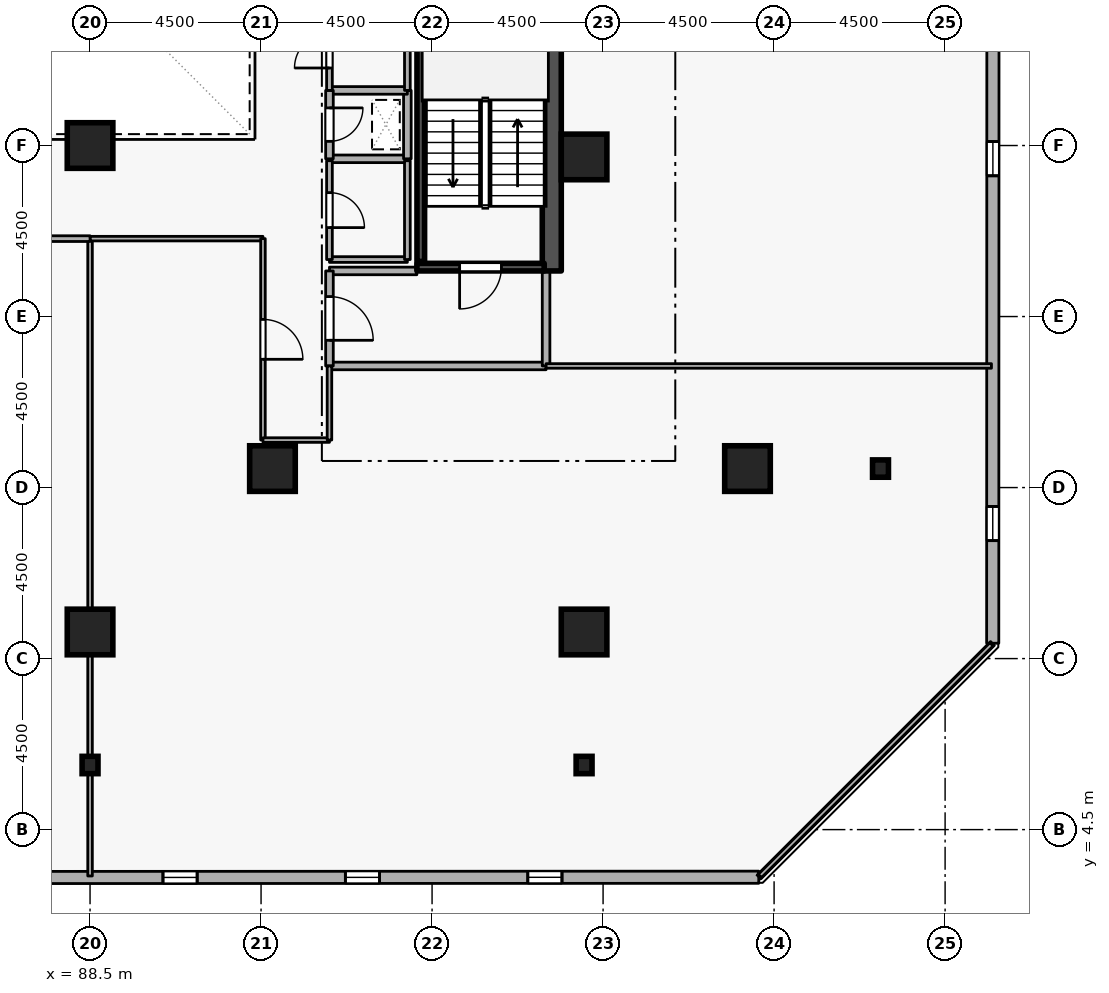
"""IFC4 building model, lengths in metres.
Left out: names, types, materials, properties, quantities, classifications, styles, units other than length and angle.
Written with IfcOpenShell. Run it as: python <this file> out.ifc"""

import sys

from ifc_helpers import new_model, si_unit, direction, frame, frame_2d, origin, origin_2d, place, context, subcontext, project, spatial, rectangle, i_section, extrude, element, fill, save


model = new_model("IFC4")
c1 = context("Model", 3, precision=1e-05, world=origin(), true_north=direction((0.0, 1.0)))
c2 = subcontext(c1, "Body", "Model", "MODEL_VIEW")
j1 = project(units=[si_unit("LENGTHUNIT", "METRE"), si_unit("PLANEANGLEUNIT", "RADIAN")], contexts=[c1])
p1 = place(None, origin())
s1 = spatial("IfcSite", under=j1, at=p1, CompositionType="ELEMENT")
p2 = place(p1, origin())
s2 = spatial("IfcBuilding", under=s1, at=p2, CompositionType="ELEMENT")
p3 = place(p2, frame((0.0, 0.0, 119.7)))
s3 = spatial("IfcBuildingStorey", under=s2, at=p3, CompositionType="ELEMENT", Elevation=119.7)
p4 = place(p3, frame((100.65, 19.2, 0.0), z_axis=(0.0, 0.0, 1.0), x_axis=(0.0, 1.0, 0.0)))
e1 = element("IfcWall", 1, at=p4, inside=s3, PredefinedType="SHEAR", context=c2, shape_type="SweptSolid", body=[
    extrude(rectangle(XDim=15.6, YDim=0.5, at=frame_2d((7.8, 0.0))), origin(), (0.0, 0.0, 1.0), 3.6),
])
for number, where, z_axis, x_axis in (
    (2, (105.8, 14.0, 0.0), (0.0, 0.0, 1.0), (1.0, 0.0, 0.0)),
    (3, (101.5, 9.7, 0.0), (0.0, 0.0, 1.0), (1.0, 0.0, 0.0)),
    (4, (88.5, 9.7, 0.0), (0.0, 0.0, 1.0), (1.0, 0.0, 0.0)),
    (5, (93.3, 14.0, 0.0), (0.0, 0.0, 1.0), (1.0, 0.0, 0.0)),
    (6, (101.5, 22.2, 0.0), (0.0, 0.0, 1.0), (1.0, 0.0, 0.0)),
    (7, (88.5, 22.5, 0.0), (0.0, 0.0, 1.0), (1.0, 0.0, 0.0)),
):
    element("IfcColumn", number, at=place(p3, frame(where, z_axis=z_axis, x_axis=x_axis)), inside=s3, PredefinedType="COLUMN", context=c2, shape_type="SweptSolid", body=[
        extrude(rectangle(XDim=1.2, YDim=1.2, at=origin_2d()), origin(), (0.0, 0.0, 1.0), 3.6),
    ])
for number, where, z_axis, x_axis in (
    (8, (109.3, 14.0, 0.0), (0.0, 0.0, 1.0), (1.0, 0.0, 0.0)),
    (9, (101.5, 6.2, 0.0), (0.0, 0.0, 1.0), (1.0, 0.0, 0.0)),
    (10, (88.5, 6.2, 0.0), (0.0, 0.0, 1.0), (1.0, 0.0, 0.0)),
):
    element("IfcColumn", number, at=place(p3, frame(where, z_axis=z_axis, x_axis=x_axis)), inside=s3, PredefinedType="COLUMN", context=c2, shape_type="SweptSolid", body=[
        extrude(i_section(OverallWidth=0.418, OverallDepth=0.456, WebThickness=0.042, FlangeThickness=0.067, FilletRadius=0.015, at=origin_2d()), origin(), (0.0, 0.0, 1.0), 3.6),
    ])
p5 = place(p3, frame((73.319, 3.235, 0.0), z_axis=(0.0, 0.0, 1.0), x_axis=(0.999999933399, 0.000364968916, 0.0)))
e11 = element("IfcWall", 11, at=p5, inside=s3, PredefinedType="STANDARD", context=c2, shape_type="SweptSolid", body=[
    extrude(rectangle(XDim=32.778, YDim=0.32, at=frame_2d((16.389, 0.0))), origin(), (0.0, 0.0, 1.0), 2.7),
])
p6 = place(p5, frame((2.7, 0.0, 0.72)))
e12 = element("IfcOpeningElement", 12, at=p6, cuts=e11, PredefinedType="OPENING", context=c2, shape_type="SweptSolid", body=[
    extrude(rectangle(XDim=0.9, YDim=1.75, at=frame_2d((0.45, 0.875))), frame((0.0, 0.17, 0.0), z_axis=(0.0, -1.0, 0.0), x_axis=(1.0, 0.0, 0.0)), (0.0, 0.0, 1.0), 0.34),
])
p7 = place(p5, frame((7.5, 0.0, 0.72)))
e13 = element("IfcOpeningElement", 13, at=p7, cuts=e11, PredefinedType="OPENING", context=c2, shape_type="SweptSolid", body=[
    extrude(rectangle(XDim=0.9, YDim=1.75, at=frame_2d((0.45, 0.875))), frame((0.0, 0.17, 0.0), z_axis=(0.0, -1.0, 0.0), x_axis=(1.0, 0.0, 0.0)), (0.0, 0.0, 1.0), 0.34),
])
p8 = place(p5, frame((12.3, 0.0, 0.72)))
e14 = element("IfcOpeningElement", 14, at=p8, cuts=e11, PredefinedType="OPENING", context=c2, shape_type="SweptSolid", body=[
    extrude(rectangle(XDim=0.9, YDim=1.75, at=frame_2d((0.45, 0.875))), frame((0.0, 0.17, 0.0), z_axis=(0.0, -1.0, 0.0), x_axis=(1.0, 0.0, 0.0)), (0.0, 0.0, 1.0), 0.34),
])
p9 = place(p5, frame((17.1, 0.0, 0.72)))
e15 = element("IfcOpeningElement", 15, at=p9, cuts=e11, PredefinedType="OPENING", context=c2, shape_type="SweptSolid", body=[
    extrude(rectangle(XDim=0.9, YDim=1.75, at=frame_2d((0.45, 0.875))), frame((0.0, 0.17, 0.0), z_axis=(0.0, -1.0, 0.0), x_axis=(1.0, 0.0, 0.0)), (0.0, 0.0, 1.0), 0.34),
])
p10 = place(p5, frame((21.9, 0.0, 0.72)))
e16 = element("IfcOpeningElement", 16, at=p10, cuts=e11, PredefinedType="OPENING", context=c2, shape_type="SweptSolid", body=[
    extrude(rectangle(XDim=0.9, YDim=1.75, at=frame_2d((0.45, 0.875))), frame((0.0, 0.17, 0.0), z_axis=(0.0, -1.0, 0.0), x_axis=(1.0, 0.0, 0.0)), (0.0, 0.0, 1.0), 0.34),
])
p11 = place(p5, frame((26.7, 0.0, 0.72)))
e17 = element("IfcOpeningElement", 17, at=p11, cuts=e11, PredefinedType="OPENING", context=c2, shape_type="SweptSolid", body=[
    extrude(rectangle(XDim=0.9, YDim=1.75, at=frame_2d((0.45, 0.875))), frame((0.0, 0.17, 0.0), z_axis=(0.0, -1.0, 0.0), x_axis=(1.0, 0.0, 0.0)), (0.0, 0.0, 1.0), 0.34),
])
p12 = place(p3, frame((112.253, 9.404, 0.0), z_axis=(0.0, 0.0, 1.0), x_axis=(0.000364968916, 0.999999933399, 0.0)))
e18 = element("IfcWall", 18, at=p12, inside=s3, PredefinedType="STANDARD", context=c2, shape_type="SweptSolid", body=[
    extrude(rectangle(XDim=32.778, YDim=0.32, at=frame_2d((16.389, 0.0))), origin(), (0.0, 0.0, 1.0), 2.7),
])
p13 = place(p12, frame((2.7, 0.0, 0.72)))
e19 = element("IfcOpeningElement", 19, at=p13, cuts=e18, PredefinedType="OPENING", context=c2, shape_type="SweptSolid", body=[
    extrude(rectangle(XDim=0.9, YDim=1.75, at=frame_2d((0.45, 0.875))), frame((0.0, 0.17, 0.0), z_axis=(0.0, -1.0, 0.0), x_axis=(1.0, 0.0, 0.0)), (0.0, 0.0, 1.0), 0.34),
])
p14 = place(p12, frame((12.3, 0.0, 0.72)))
e20 = element("IfcOpeningElement", 20, at=p14, cuts=e18, PredefinedType="OPENING", context=c2, shape_type="SweptSolid", body=[
    extrude(rectangle(XDim=0.9, YDim=1.75, at=frame_2d((0.45, 0.875))), frame((0.0, 0.17, 0.0), z_axis=(0.0, -1.0, 0.0), x_axis=(1.0, 0.0, 0.0)), (0.0, 0.0, 1.0), 0.34),
])
p15 = place(p12, frame((17.1, 0.0, 0.72)))
e21 = element("IfcOpeningElement", 21, at=p15, cuts=e18, PredefinedType="OPENING", context=c2, shape_type="SweptSolid", body=[
    extrude(rectangle(XDim=0.9, YDim=1.75, at=frame_2d((0.45, 0.875))), frame((0.0, 0.17, 0.0), z_axis=(0.0, -1.0, 0.0), x_axis=(1.0, 0.0, 0.0)), (0.0, 0.0, 1.0), 0.34),
])
p16 = place(p12, frame((21.9, 0.0, 0.72)))
e22 = element("IfcOpeningElement", 22, at=p16, cuts=e18, PredefinedType="OPENING", context=c2, shape_type="SweptSolid", body=[
    extrude(rectangle(XDim=0.9, YDim=1.75, at=frame_2d((0.45, 0.875))), frame((0.0, 0.17, 0.0), z_axis=(0.0, -1.0, 0.0), x_axis=(1.0, 0.0, 0.0)), (0.0, 0.0, 1.0), 0.34),
])
p17 = place(p12, frame((26.7, 0.0, 0.72)))
e23 = element("IfcOpeningElement", 23, at=p17, cuts=e18, PredefinedType="OPENING", context=c2, shape_type="SweptSolid", body=[
    extrude(rectangle(XDim=0.9, YDim=1.75, at=frame_2d((0.45, 0.875))), frame((0.0, 0.17, 0.0), z_axis=(0.0, -1.0, 0.0), x_axis=(1.0, 0.0, 0.0)), (0.0, 0.0, 1.0), 0.34),
])
p18 = place(p3, frame((100.45, 19.3, 0.0), z_axis=(0.0, 0.0, 1.0), x_axis=(-1.0, 0.0, 0.0)))
e24 = element("IfcWall", 24, at=p18, inside=s3, PredefinedType="SHEAR", context=c2, shape_type="SweptSolid", body=[
    extrude(rectangle(XDim=3.35, YDim=0.2, at=frame_2d((1.675, 0.0))), origin(), (0.0, 0.0, 1.0), 3.6),
])
p19 = place(p18, frame((1.125, 0.0, 0.0)))
e25 = element("IfcOpeningElement", 25, at=p19, cuts=e24, PredefinedType="OPENING", context=c2, shape_type="SweptSolid", body=[
    extrude(rectangle(XDim=1.1, YDim=2.1, at=frame_2d((0.55, 1.05))), frame((0.0, 0.11, 0.0), z_axis=(0.0, -1.0, 0.0), x_axis=(1.0, 0.0, 0.0)), (0.0, 0.0, 1.0), 0.22),
])
p20 = place(p3, frame((97.203, 26.55, 0.0), z_axis=(0.0, 0.0, 1.0), x_axis=(0.0, -1.0, 0.0)))
e26 = element("IfcWall", 26, at=p20, inside=s3, PredefinedType="SHEAR", context=c2, shape_type="SweptSolid", body=[
    extrude(rectangle(XDim=7.1, YDim=0.2, at=frame_2d((3.55, 0.0))), origin(), (0.0, 0.0, 1.0), 3.6),
])
p21 = place(p3, frame((94.8, 16.7, 0.0), z_axis=(0.0, 0.0, 1.0), x_axis=(1.0, 0.0, 0.0)))
e27 = element("IfcWall", 27, at=p21, inside=s3, PredefinedType="STANDARD", context=c2, shape_type="SweptSolid", body=[
    extrude(rectangle(XDim=5.7, YDim=0.2, at=frame_2d((2.85, 0.0))), origin(), (0.0, 0.0, 1.0), 3.32),
])
p22 = place(p3, frame((100.5, 16.7, 0.0), z_axis=(0.0, 0.0, 1.0), x_axis=(0.0, 1.0, 0.0)))
e28 = element("IfcWall", 28, at=p22, inside=s3, PredefinedType="STANDARD", context=c2, shape_type="SweptSolid", body=[
    extrude(rectangle(XDim=2.5, YDim=0.2, at=frame_2d((1.25, 0.0))), origin(), (0.0, 0.0, 1.0), 3.32),
])
p23 = place(p3, frame((97.1, 19.2, 0.0), z_axis=(0.0, 0.0, 1.0), x_axis=(-1.0, 0.0, 0.0)))
e29 = element("IfcWall", 29, at=p23, inside=s3, PredefinedType="STANDARD", context=c2, shape_type="SweptSolid", body=[
    extrude(rectangle(XDim=2.3, YDim=0.2, at=frame_2d((1.15, 0.0))), origin(), (0.0, 0.0, 1.0), 2.525),
])
p24 = place(p3, frame((94.8, 19.2, 0.0), z_axis=(0.0, 0.0, 1.0), x_axis=(0.0, -1.0, 0.0)))
e30 = element("IfcWall", 30, at=p24, inside=s3, PredefinedType="STANDARD", context=c2, shape_type="SweptSolid", body=[
    extrude(rectangle(XDim=2.5, YDim=0.2, at=frame_2d((1.25, 0.0))), origin(), (0.0, 0.0, 1.0), 3.32),
])
p25 = place(p24, frame((0.675, 0.0, 0.0)))
e31 = element("IfcOpeningElement", 31, at=p25, cuts=e30, PredefinedType="OPENING", context=c2, shape_type="SweptSolid", body=[
    extrude(rectangle(XDim=1.15, YDim=2.1, at=frame_2d((0.575, 1.05))), frame((0.0, 0.11, 0.0), z_axis=(0.0, -1.0, 0.0), x_axis=(1.0, 0.0, 0.0)), (0.0, 0.0, 1.0), 0.22),
])
p26 = place(p3, frame((94.8, 22.15, 0.0), z_axis=(0.0, 0.0, 1.0), x_axis=(1.0, 0.0, 0.0)))
e32 = element("IfcWall", 32, at=p26, inside=s3, PredefinedType="STANDARD", context=c2, shape_type="SweptSolid", body=[
    extrude(rectangle(XDim=2.05, YDim=0.2, at=frame_2d((1.025, 0.0))), origin(), (0.0, 0.0, 1.0), 3.32),
])
p27 = place(p3, frame((96.85, 22.15, 0.0), z_axis=(0.0, 0.0, 1.0), x_axis=(0.0, 1.0, 0.0)))
e33 = element("IfcWall", 33, at=p27, inside=s3, PredefinedType="STANDARD", context=c2, shape_type="SweptSolid", body=[
    extrude(rectangle(XDim=1.8, YDim=0.2, at=frame_2d((0.9, 0.0))), origin(), (0.0, 0.0, 1.0), 3.32),
])
p28 = place(p3, frame((96.85, 23.95, 0.0), z_axis=(0.0, 0.0, 1.0), x_axis=(-1.0, 0.0, 0.0)))
e34 = element("IfcWall", 34, at=p28, inside=s3, PredefinedType="STANDARD", context=c2, shape_type="SweptSolid", body=[
    extrude(rectangle(XDim=2.05, YDim=0.2, at=frame_2d((1.025, 0.0))), origin(), (0.0, 0.0, 1.0), 3.32),
])
p29 = place(p3, frame((94.8, 23.95, 0.0), z_axis=(0.0, 0.0, 1.0), x_axis=(0.0, -1.0, 0.0)))
e35 = element("IfcWall", 35, at=p29, inside=s3, PredefinedType="STANDARD", context=c2, shape_type="SweptSolid", body=[
    extrude(rectangle(XDim=1.8, YDim=0.2, at=frame_2d((0.9, 0.0))), origin(), (0.0, 0.0, 1.0), 3.32),
])
p30 = place(p29, frame((0.46, 0.0, 0.0)))
e36 = element("IfcOpeningElement", 36, at=p30, cuts=e35, PredefinedType="OPENING", context=c2, shape_type="SweptSolid", body=[
    extrude(rectangle(XDim=0.88, YDim=2.04, at=frame_2d((0.44, 1.02))), frame((0.0, 0.11, 0.0), z_axis=(0.0, -1.0, 0.0), x_axis=(1.0, 0.0, 0.0)), (0.0, 0.0, 1.0), 0.22),
])
p31 = place(p3, frame((94.8, 19.5, 0.0), z_axis=(0.0, 0.0, 1.0), x_axis=(1.0, 0.0, 0.0)))
e37 = element("IfcWall", 37, at=p31, inside=s3, PredefinedType="PARTITIONING", context=c2, shape_type="SweptSolid", body=[
    extrude(rectangle(XDim=2.05, YDim=0.15, at=frame_2d((1.025, 0.0))), origin(), (0.0, 0.0, 1.0), 2.525),
])
p32 = place(p3, frame((96.85, 19.5, 0.0), z_axis=(0.0, 0.0, 1.0), x_axis=(0.0, 1.0, 0.0)))
e38 = element("IfcWall", 38, at=p32, inside=s3, PredefinedType="PARTITIONING", context=c2, shape_type="SweptSolid", body=[
    extrude(rectangle(XDim=2.6, YDim=0.15, at=frame_2d((1.3, 0.0))), origin(), (0.0, 0.0, 1.0), 3.32),
])
p33 = place(p3, frame((94.8, 22.1, 0.0), z_axis=(0.0, 0.0, 1.0), x_axis=(0.0, -1.0, 0.0)))
e39 = element("IfcWall", 39, at=p33, inside=s3, PredefinedType="PARTITIONING", context=c2, shape_type="SweptSolid", body=[
    extrude(rectangle(XDim=2.6, YDim=0.15, at=frame_2d((1.3, 0.0))), origin(), (0.0, 0.0, 1.0), 3.32),
])
p34 = place(p33, frame((0.84, 0.0, 0.0)))
e40 = element("IfcOpeningElement", 40, at=p34, cuts=e39, PredefinedType="OPENING", context=c2, shape_type="SweptSolid", body=[
    extrude(rectangle(XDim=0.92, YDim=2.08, at=frame_2d((0.46, 1.04))), frame((0.0, 0.085, 0.0), z_axis=(0.0, -1.0, 0.0), x_axis=(1.0, 0.0, 0.0)), (0.0, 0.0, 1.0), 0.17),
])
p35 = place(p3, frame((94.8, 23.95, 0.0), z_axis=(0.0, 0.0, 1.0), x_axis=(0.0, 1.0, 0.0)))
e41 = element("IfcWall", 41, at=p35, inside=s3, PredefinedType="PARTITIONING", context=c2, shape_type="SweptSolid", body=[
    extrude(rectangle(XDim=2.1, YDim=0.15, at=frame_2d((1.05, 0.0))), origin(), (0.0, 0.0, 1.0), 3.32),
])
p36 = place(p35, frame((0.59, 0.0, 0.0)))
e42 = element("IfcOpeningElement", 42, at=p36, cuts=e41, PredefinedType="OPENING", context=c2, shape_type="SweptSolid", body=[
    extrude(rectangle(XDim=0.92, YDim=2.08, at=frame_2d((0.46, 1.04))), frame((0.0, 0.085, 0.0), z_axis=(0.0, -1.0, 0.0), x_axis=(1.0, 0.0, 0.0)), (0.0, 0.0, 1.0), 0.17),
])
p37 = place(p3, frame((96.85, 26.05, 0.0), z_axis=(0.0, 0.0, 1.0), x_axis=(0.0, -1.0, 0.0)))
e43 = element("IfcWall", 43, at=p37, inside=s3, PredefinedType="PARTITIONING", context=c2, shape_type="SweptSolid", body=[
    extrude(rectangle(XDim=2.1, YDim=0.15, at=frame_2d((1.05, 0.0))), origin(), (0.0, 0.0, 1.0), 3.32),
])
p38 = place(p3, frame((88.5, 3.28, 0.0), z_axis=(0.0, 0.0, 1.0), x_axis=(0.0, 1.0, 0.0)))
e44 = element("IfcWall", 44, at=p38, inside=s3, PredefinedType="PARTITIONING", context=c2, shape_type="SweptSolid", body=[
    extrude(rectangle(XDim=16.77, YDim=0.12, at=frame_2d((8.385, 0.0))), origin(), (0.0, 0.0, 1.0), 2.912),
])
p39 = place(p3, frame((88.5, 20.05, 0.0), z_axis=(0.0, 0.0, 1.0), x_axis=(1.0, 0.0, 0.0)))
e45 = element("IfcWall", 45, at=p39, inside=s3, PredefinedType="PARTITIONING", context=c2, shape_type="SweptSolid", body=[
    extrude(rectangle(XDim=4.55, YDim=0.12, at=frame_2d((2.275, 0.0))), origin(), (0.0, 0.0, 1.0), 3.32),
])
p40 = place(p3, frame((93.05, 20.05, 0.0), z_axis=(0.0, 0.0, 1.0), x_axis=(0.0, -1.0, 0.0)))
e46 = element("IfcWall", 46, at=p40, inside=s3, PredefinedType="PARTITIONING", context=c2, shape_type="SweptSolid", body=[
    extrude(rectangle(XDim=5.3, YDim=0.12, at=frame_2d((2.65, 0.0))), origin(), (0.0, 0.0, 1.0), 3.32),
])
p41 = place(p40, frame((2.125, 0.0, 0.0)))
e47 = element("IfcOpeningElement", 47, at=p41, cuts=e46, PredefinedType="OPENING", context=c2, shape_type="SweptSolid", body=[
    extrude(rectangle(XDim=1.05, YDim=2.1, at=frame_2d((0.525, 1.05))), frame((0.0, 0.07, 0.0), z_axis=(0.0, -1.0, 0.0), x_axis=(1.0, 0.0, 0.0)), (0.0, 0.0, 1.0), 0.14),
])
p42 = place(p3, frame((93.05, 14.75, 0.0), z_axis=(0.0, 0.0, 1.0), x_axis=(1.0, 0.0, 0.0)))
e48 = element("IfcWall", 48, at=p42, inside=s3, PredefinedType="PARTITIONING", context=c2, shape_type="SweptSolid", body=[
    extrude(rectangle(XDim=1.75, YDim=0.12, at=frame_2d((0.875, 0.0))), origin(), (0.0, 0.0, 1.0), 3.32),
])
p43 = place(p3, frame((94.8, 14.75, 0.0), z_axis=(0.0, 0.0, 1.0), x_axis=(0.0, 1.0, 0.0)))
e49 = element("IfcWall", 49, at=p43, inside=s3, PredefinedType="PARTITIONING", context=c2, shape_type="SweptSolid", body=[
    extrude(rectangle(XDim=1.95, YDim=0.12, at=frame_2d((0.975, 0.0))), origin(), (0.0, 0.0, 1.0), 3.32),
])
p44 = place(p3, frame((100.5, 16.7, 0.0), z_axis=(0.0, 0.0, 1.0), x_axis=(1.0, 0.0, 0.0)))
e50 = element("IfcWall", 50, at=p44, inside=s3, PredefinedType="PARTITIONING", context=c2, shape_type="SweptSolid", body=[
    extrude(rectangle(XDim=11.72, YDim=0.12, at=frame_2d((5.86, 0.0))), origin(), (0.0, 0.0, 1.0), 3.32),
])
p45 = place(p3, frame((112.22, 9.375, 0.0), z_axis=(0.0, 0.0, 1.0), x_axis=(-0.707106781187, -0.707106781187, 0.0)))
e51 = element("IfcWall", 51, at=p45, inside=s3, PredefinedType="PARTITIONING", context=c2, shape_type="SweptSolid", body=[
    extrude(rectangle(XDim=8.619, YDim=0.12, at=frame_2d((4.31, 0.0))), origin(), (0.0, 0.0, 1.0), 3.32),
])
p46 = place(p3, frame((83.95, 20.05, 0.0), z_axis=(0.0, 0.0, 1.0), x_axis=(1.0, 0.0, 0.0)))
e52 = element("IfcWall", 52, at=p46, inside=s3, PredefinedType="PARTITIONING", context=c2, shape_type="SweptSolid", body=[
    extrude(rectangle(XDim=4.55, YDim=0.15, at=frame_2d((2.275, 0.0))), origin(), (0.0, 0.0, 1.0), 3.32),
])
p47 = place(p9, origin())
e53 = element("IfcWindow", 53, at=p47, inside=s3, PartitioningType="SINGLE_PANEL", PredefinedType="WINDOW", context=c2, shape_type="SweptSolid", body=[
    extrude(rectangle(XDim=0.9, YDim=1.75, at=frame_2d((0.45, 0.875))), frame((0.0, 0.03, 0.0), z_axis=(0.0, -1.0, 0.0), x_axis=(1.0, 0.0, 0.0)), (0.0, 0.0, 1.0), 0.06),
])
fill(e15, e53)
p48 = place(p10, origin())
e54 = element("IfcWindow", 54, at=p48, inside=s3, PartitioningType="SINGLE_PANEL", PredefinedType="WINDOW", context=c2, shape_type="SweptSolid", body=[
    extrude(rectangle(XDim=0.9, YDim=1.75, at=frame_2d((0.45, 0.875))), frame((0.0, 0.03, 0.0), z_axis=(0.0, -1.0, 0.0), x_axis=(1.0, 0.0, 0.0)), (0.0, 0.0, 1.0), 0.06),
])
fill(e16, e54)
p49 = place(p11, origin())
e55 = element("IfcWindow", 55, at=p49, inside=s3, PartitioningType="SINGLE_PANEL", PredefinedType="WINDOW", context=c2, shape_type="SweptSolid", body=[
    extrude(rectangle(XDim=0.9, YDim=1.75, at=frame_2d((0.45, 0.875))), frame((0.0, 0.03, 0.0), z_axis=(0.0, -1.0, 0.0), x_axis=(1.0, 0.0, 0.0)), (0.0, 0.0, 1.0), 0.06),
])
fill(e17, e55)
p50 = place(p13, origin())
e56 = element("IfcWindow", 56, at=p50, inside=s3, PartitioningType="SINGLE_PANEL", PredefinedType="WINDOW", context=c2, shape_type="SweptSolid", body=[
    extrude(rectangle(XDim=0.9, YDim=1.75, at=frame_2d((0.45, 0.875))), frame((0.0, 0.03, 0.0), z_axis=(0.0, -1.0, 0.0), x_axis=(1.0, 0.0, 0.0)), (0.0, 0.0, 1.0), 0.06),
])
fill(e19, e56)
p51 = place(p14, origin())
e57 = element("IfcWindow", 57, at=p51, inside=s3, PartitioningType="SINGLE_PANEL", PredefinedType="WINDOW", context=c2, shape_type="SweptSolid", body=[
    extrude(rectangle(XDim=0.9, YDim=1.75, at=frame_2d((0.45, 0.875))), frame((0.0, 0.03, 0.0), z_axis=(0.0, -1.0, 0.0), x_axis=(1.0, 0.0, 0.0)), (0.0, 0.0, 1.0), 0.06),
])
fill(e20, e57)
p52 = place(p19, origin())
e58 = element("IfcDoor", 58, at=p52, inside=s3, OperationType="SINGLE_SWING_RIGHT", PredefinedType="DOOR", context=c2, shape_type="SweptSolid", body=[
    extrude(rectangle(XDim=1.1, YDim=2.1, at=frame_2d((0.55, 1.05))), frame((0.0, 0.025, 0.0), z_axis=(0.0, -1.0, 0.0), x_axis=(1.0, 0.0, 0.0)), (0.0, 0.0, 1.0), 0.05),
])
fill(e25, e58)
p53 = place(p25, origin())
e59 = element("IfcDoor", 59, at=p53, inside=s3, OperationType="SINGLE_SWING_RIGHT", PredefinedType="DOOR", context=c2, shape_type="SweptSolid", body=[
    extrude(rectangle(XDim=1.15, YDim=2.1, at=frame_2d((0.575, 1.05))), frame((0.0, 0.025, 0.0), z_axis=(0.0, -1.0, 0.0), x_axis=(1.0, 0.0, 0.0)), (0.0, 0.0, 1.0), 0.05),
])
fill(e31, e59)
p54 = place(p30, origin())
e60 = element("IfcDoor", 60, at=p54, inside=s3, OperationType="SINGLE_SWING_LEFT", PredefinedType="DOOR", context=c2, shape_type="SweptSolid", body=[
    extrude(rectangle(XDim=0.88, YDim=2.04, at=frame_2d((0.44, 1.02))), frame((0.0, 0.025, 0.0), z_axis=(0.0, -1.0, 0.0), x_axis=(1.0, 0.0, 0.0)), (0.0, 0.0, 1.0), 0.05),
])
fill(e36, e60)
p55 = place(p34, origin())
e61 = element("IfcDoor", 61, at=p55, inside=s3, OperationType="SINGLE_SWING_RIGHT", PredefinedType="DOOR", context=c2, shape_type="SweptSolid", body=[
    extrude(rectangle(XDim=0.92, YDim=2.08, at=frame_2d((0.46, 1.04))), frame((0.0, 0.025, 0.0), z_axis=(0.0, -1.0, 0.0), x_axis=(1.0, 0.0, 0.0)), (0.0, 0.0, 1.0), 0.05),
])
fill(e40, e61)
p56 = place(p36, origin())
e62 = element("IfcDoor", 62, at=p56, inside=s3, OperationType="SINGLE_SWING_LEFT", PredefinedType="DOOR", context=c2, shape_type="SweptSolid", body=[
    extrude(rectangle(XDim=0.92, YDim=2.08, at=frame_2d((0.46, 1.04))), frame((0.0, 0.025, 0.0), z_axis=(0.0, -1.0, 0.0), x_axis=(1.0, 0.0, 0.0)), (0.0, 0.0, 1.0), 0.05),
])
fill(e42, e62)
p57 = place(p41, origin())
e63 = element("IfcDoor", 63, at=p57, inside=s3, OperationType="SINGLE_SWING_RIGHT", PredefinedType="DOOR", context=c2, shape_type="SweptSolid", body=[
    extrude(rectangle(XDim=1.05, YDim=2.1, at=frame_2d((0.525, 1.05))), frame((0.0, 0.025, 0.0), z_axis=(0.0, -1.0, 0.0), x_axis=(1.0, 0.0, 0.0)), (0.0, 0.0, 1.0), 0.05),
])
fill(e47, e63)
save(model, sys.argv[1])
